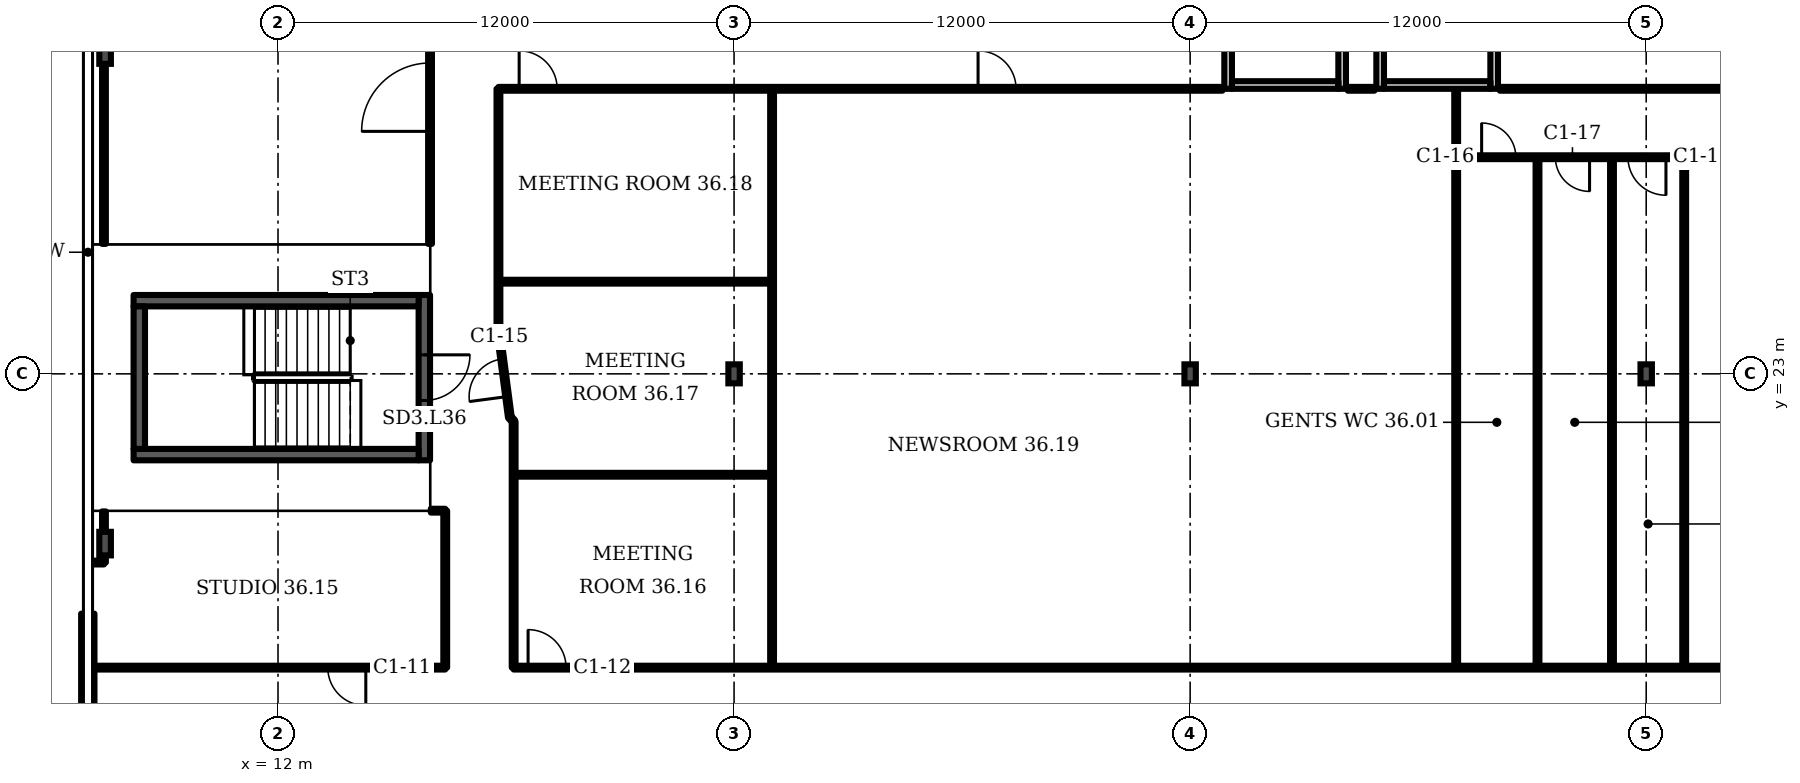
"""IFC4 building model, lengths in metres.
Left out: names, types, materials, properties, quantities, classifications, styles, units other than length and angle.
Written with IfcOpenShell. Run it as: python <this file> out.ifc"""

import sys

from ifc_helpers import new_model, si_unit, direction, frame, frame_2d, origin, origin_2d, place, context, subcontext, project, spatial, rectangle, i_section, extrude, element, fill, save


model = new_model("IFC4")
c1 = context("Model", 3, precision=1e-05, world=origin(), true_north=direction((0.0, 1.0)))
c2 = subcontext(c1, "Body", "Model", "MODEL_VIEW")
j1 = project(units=[si_unit("LENGTHUNIT", "METRE"), si_unit("PLANEANGLEUNIT", "RADIAN")], contexts=[c1])
p1 = place(None, origin())
s1 = spatial("IfcSite", under=j1, at=p1, CompositionType="ELEMENT")
p2 = place(p1, origin())
s2 = spatial("IfcBuilding", under=s1, at=p2, CompositionType="ELEMENT")
p3 = place(p2, frame((0.0, 0.0, 151.9)))
s3 = spatial("IfcBuildingStorey", under=s2, at=p3, CompositionType="ELEMENT", Elevation=151.9)
for number, where, z_axis, x_axis in (
    (1, (7.45, 31.467, 0.0), (0.0, 0.0, 1.0), (-1.0, 0.0, 0.0)),
    (2, (7.45, 18.533, 0.0), (0.0, 0.0, 1.0), (-1.0, 0.0, 0.0)),
):
    element("IfcColumn", number, at=place(p3, frame(where, z_axis=z_axis, x_axis=x_axis)), inside=s3, PredefinedType="COLUMN", context=c2, shape_type="SweptSolid", body=[
        extrude(i_section(OverallWidth=0.305, OverallDepth=0.62, WebThickness=0.021, FlangeThickness=0.04, FilletRadius=0.027, at=origin_2d()), origin(), (0.0, 0.0, 1.0), 3.6),
    ])
for number, where, z_axis, x_axis in (
    (3, (24.0, 23.0, 0.0), (0.0, 0.0, 1.0), (1.0, 0.0, 0.0)),
    (4, (36.0, 23.0, 0.0), (0.0, 0.0, 1.0), (1.0, 0.0, 0.0)),
    (5, (48.0, 23.0, 0.0), (0.0, 0.0, 1.0), (1.0, 0.0, 0.0)),
):
    element("IfcColumn", number, at=place(p3, frame(where, z_axis=z_axis, x_axis=x_axis)), inside=s3, PredefinedType="COLUMN", context=c2, shape_type="SweptSolid", body=[
        extrude(i_section(OverallWidth=0.3, OverallDepth=0.5, WebThickness=0.014, FlangeThickness=0.028, FilletRadius=0.027, at=origin_2d()), origin(), (0.0, 0.0, 1.0), 3.6),
    ])
p4 = place(p3, frame((6.995, 16.69, 0.0), z_axis=(0.0, 0.0, 1.0), x_axis=(0.0, -1.0, 0.0)))
e6 = element("IfcWall", 6, at=p4, inside=s3, PredefinedType="SOLIDWALL", context=c2, shape_type="SweptSolid", body=[
    extrude(rectangle(XDim=6.29, YDim=0.35, at=frame_2d((3.145, 0.0))), origin(), (0.0, 0.0, 1.0), 1.0),
])
p5 = place(p3, frame((37.0, 30.5, 0.0), z_axis=(0.0, 0.0, 1.0), x_axis=(0.0, 1.0, 0.0)))
e7 = element("IfcWall", 7, at=p5, inside=s3, PredefinedType="PARTITIONING", context=c2, shape_type="SweptSolid", body=[
    extrude(rectangle(XDim=3.5, YDim=0.2, at=frame_2d((1.75, 0.0))), origin(), (0.0, 0.0, 1.0), 3.2),
])
p6 = place(p5, frame((1.2, 0.0, 0.0)))
e8 = element("IfcOpeningElement", 8, at=p6, cuts=e7, PredefinedType="OPENING", context=c2, shape_type="SweptSolid", body=[
    extrude(rectangle(XDim=1.1, YDim=2.1, at=frame_2d((0.55, 1.05))), frame((0.0, 0.11, 0.0), z_axis=(0.0, -1.0, 0.0), x_axis=(1.0, 0.0, 0.0)), (0.0, 0.0, 1.0), 0.22),
])
p7 = place(p3, frame((40.0, 30.5, 0.0), z_axis=(0.0, 0.0, 1.0), x_axis=(0.0, 1.0, 0.0)))
e9 = element("IfcWall", 9, at=p7, inside=s3, PredefinedType="PARTITIONING", context=c2, shape_type="SweptSolid", body=[
    extrude(rectangle(XDim=3.5, YDim=0.2, at=frame_2d((1.75, 0.0))), origin(), (0.0, 0.0, 1.0), 3.2),
])
p8 = place(p3, frame((37.1, 30.6, 0.0), z_axis=(0.0, 0.0, 1.0), x_axis=(1.0, 0.0, 0.0)))
e10 = element("IfcWall", 10, at=p8, inside=s3, PredefinedType="PARTITIONING", context=c2, shape_type="SweptSolid", body=[
    extrude(rectangle(XDim=2.8, YDim=0.2, at=frame_2d((1.4, 0.0))), origin(), (0.0, 0.0, 1.0), 3.2),
])
p9 = place(p3, frame((41.0, 30.5, 0.0), z_axis=(0.0, 0.0, 1.0), x_axis=(0.0, 1.0, 0.0)))
e11 = element("IfcWall", 11, at=p9, inside=s3, PredefinedType="PARTITIONING", context=c2, shape_type="SweptSolid", body=[
    extrude(rectangle(XDim=3.5, YDim=0.2, at=frame_2d((1.75, 0.0))), origin(), (0.0, 0.0, 1.0), 3.2),
])
p10 = place(p3, frame((44.0, 30.5, 0.0), z_axis=(0.0, 0.0, 1.0), x_axis=(0.0, 1.0, 0.0)))
e12 = element("IfcWall", 12, at=p10, inside=s3, PredefinedType="PARTITIONING", context=c2, shape_type="SweptSolid", body=[
    extrude(rectangle(XDim=3.5, YDim=0.2, at=frame_2d((1.75, 0.0))), origin(), (0.0, 0.0, 1.0), 3.2),
])
p11 = place(p10, frame((1.2, 0.0, 0.0)))
e13 = element("IfcOpeningElement", 13, at=p11, cuts=e12, PredefinedType="OPENING", context=c2, shape_type="SweptSolid", body=[
    extrude(rectangle(XDim=1.1, YDim=2.1, at=frame_2d((0.55, 1.05))), frame((0.0, 0.11, 0.0), z_axis=(0.0, -1.0, 0.0), x_axis=(1.0, 0.0, 0.0)), (0.0, 0.0, 1.0), 0.22),
])
p12 = place(p3, frame((41.1, 30.6, 0.0), z_axis=(0.0, 0.0, 1.0), x_axis=(1.0, 0.0, 0.0)))
e14 = element("IfcWall", 14, at=p12, inside=s3, PredefinedType="PARTITIONING", context=c2, shape_type="SweptSolid", body=[
    extrude(rectangle(XDim=2.8, YDim=0.2, at=frame_2d((1.4, 0.0))), origin(), (0.0, 0.0, 1.0), 3.2),
])
p13 = place(p3, frame((15.85, 20.725, 0.0), z_axis=(0.0, 0.0, 1.0), x_axis=(0.0, 1.0, 0.0)))
e15 = element("IfcWall", 15, at=p13, inside=s3, PredefinedType="SHEAR", context=c2, shape_type="SweptSolid", body=[
    extrude(rectangle(XDim=4.35, YDim=0.3, at=frame_2d((2.175, 0.0))), origin(), (0.0, 0.0, 1.0), 3.2),
])
p14 = place(p13, frame((1.575, 0.0, 0.0)))
e16 = element("IfcOpeningElement", 16, at=p14, cuts=e15, PredefinedType="OPENING", context=c2, shape_type="SweptSolid", body=[
    extrude(rectangle(XDim=1.2, YDim=2.1, at=frame_2d((0.6, 1.05))), frame((0.0, 0.16, 0.0), z_axis=(0.0, -1.0, 0.0), x_axis=(1.0, 0.0, 0.0)), (0.0, 0.0, 1.0), 0.32),
])
p15 = place(p3, frame((7.02, 15.27, 0.0), z_axis=(0.0, 0.0, 1.0), x_axis=(1.0, 0.0, 0.0)))
e17 = element("IfcWall", 17, at=p15, inside=s3, PredefinedType="PARTITIONING", context=c2, shape_type="SweptSolid", body=[
    extrude(rectangle(XDim=9.38, YDim=0.1, at=frame_2d((4.69, 0.0))), origin(), (0.0, 0.0, 1.0), 3.2),
])
p16 = place(p15, frame((6.29, 0.0, 0.0)))
e18 = element("IfcOpeningElement", 18, at=p16, cuts=e17, PredefinedType="OPENING", context=c2, shape_type="SweptSolid", body=[
    extrude(rectangle(XDim=1.0, YDim=2.1, at=frame_2d((0.5, 1.05))), frame((0.0, 0.06, 0.0), z_axis=(0.0, -1.0, 0.0), x_axis=(1.0, 0.0, 0.0)), (0.0, 0.0, 1.0), 0.12),
])
p17 = place(p3, frame((7.02, 18.035, 0.0), z_axis=(0.0, 0.0, 1.0), x_axis=(1.0, 0.0, 0.0)))
e19 = element("IfcWall", 19, at=p17, inside=s3, PredefinedType="PARTITIONING", context=c2, shape_type="SweptSolid", body=[
    extrude(rectangle(XDim=0.4, YDim=0.1, at=frame_2d((0.2, 0.0))), origin(), (0.0, 0.0, 1.0), 3.2),
])
p18 = place(p3, frame((7.42, 18.035, 0.0), z_axis=(0.0, 0.0, 1.0), x_axis=(0.0, 1.0, 0.0)))
e20 = element("IfcWall", 20, at=p18, inside=s3, PredefinedType="PARTITIONING", context=c2, shape_type="SweptSolid", body=[
    extrude(rectangle(XDim=1.345, YDim=0.1, at=frame_2d((0.672, 0.0))), origin(), (0.0, 0.0, 1.0), 2.58),
])
p19 = place(p3, frame((7.42, 26.42, 0.0), z_axis=(0.0, 0.0, 1.0), x_axis=(0.0, 1.0, 0.0)))
e21 = element("IfcWall", 21, at=p19, inside=s3, PredefinedType="PARTITIONING", context=c2, shape_type="SweptSolid", body=[
    extrude(rectangle(XDim=15.56, YDim=0.1, at=frame_2d((7.78, 0.0))), origin(), (0.0, 0.0, 1.0), 2.58),
])
p20 = place(p3, frame((16.0, 26.42, 0.0), z_axis=(0.0, 0.0, 1.0), x_axis=(0.0, 1.0, 0.0)))
e22 = element("IfcWall", 22, at=p20, inside=s3, PredefinedType="PARTITIONING", context=c2, shape_type="SweptSolid", body=[
    extrude(rectangle(XDim=7.56, YDim=0.1, at=frame_2d((3.78, 0.0))), origin(), (0.0, 0.0, 1.0), 3.2),
])
p21 = place(p20, frame((2.96, 0.0, 0.0)))
e23 = element("IfcOpeningElement", 23, at=p21, cuts=e22, PredefinedType="OPENING", context=c2, shape_type="SweptSolid", body=[
    extrude(rectangle(XDim=1.8, YDim=2.1, at=frame_2d((0.9, 1.05))), frame((0.0, 0.06, 0.0), z_axis=(0.0, -1.0, 0.0), x_axis=(1.0, 0.0, 0.0)), (0.0, 0.0, 1.0), 0.12),
])
p22 = place(p3, frame((16.02, 19.4, 0.0), z_axis=(0.0, 0.0, 1.0), x_axis=(1.0, 0.0, 0.0)))
e24 = element("IfcWall", 24, at=p22, inside=s3, PredefinedType="PARTITIONING", context=c2, shape_type="SweptSolid", body=[
    extrude(rectangle(XDim=0.38, YDim=0.1, at=frame_2d((0.19, 0.0))), origin(), (0.0, 0.0, 1.0), 3.2),
])
p23 = place(p3, frame((16.4, 15.27, 0.0), z_axis=(0.0, 0.0, 1.0), x_axis=(0.0, 1.0, 0.0)))
e25 = element("IfcWall", 25, at=p23, inside=s3, PredefinedType="PARTITIONING", context=c2, shape_type="SweptSolid", body=[
    extrude(rectangle(XDim=4.13, YDim=0.1, at=frame_2d((2.065, 0.0))), origin(), (0.0, 0.0, 1.0), 3.2),
])
p24 = place(p3, frame((17.8, 24.135, 0.0), z_axis=(0.0, 0.0, 1.0), x_axis=(0.0, 1.0, 0.0)))
e26 = element("IfcWall", 26, at=p24, inside=s3, PredefinedType="PARTITIONING", context=c2, shape_type="SweptSolid", body=[
    extrude(rectangle(XDim=6.365, YDim=0.1, at=frame_2d((3.183, 0.0))), origin(), (0.0, 0.0, 1.0), 3.2),
])
p25 = place(p3, frame((17.8, 25.425, 0.0), z_axis=(0.0, 0.0, 1.0), x_axis=(1.0, 0.0, 0.0)))
e27 = element("IfcWall", 27, at=p25, inside=s3, PredefinedType="PARTITIONING", context=c2, shape_type="SweptSolid", body=[
    extrude(rectangle(XDim=7.2, YDim=0.1, at=frame_2d((3.6, 0.0))), origin(), (0.0, 0.0, 1.0), 3.2),
])
p26 = place(p3, frame((17.8, 30.5, 0.0), z_axis=(0.0, 0.0, 1.0), x_axis=(1.0, 0.0, 0.0)))
e28 = element("IfcWall", 28, at=p26, inside=s3, PredefinedType="PARTITIONING", context=c2, shape_type="SweptSolid", body=[
    extrude(rectangle(XDim=19.05, YDim=0.1, at=frame_2d((9.525, 0.0))), origin(), (0.0, 0.0, 1.0), 3.2),
])
p27 = place(p26, frame((0.545, 0.0, 0.0)))
e29 = element("IfcOpeningElement", 29, at=p27, cuts=e28, PredefinedType="OPENING", context=c2, shape_type="SweptSolid", body=[
    extrude(rectangle(XDim=1.0, YDim=2.1, at=frame_2d((0.5, 1.05))), frame((0.0, 0.06, 0.0), z_axis=(0.0, -1.0, 0.0), x_axis=(1.0, 0.0, 0.0)), (0.0, 0.0, 1.0), 0.12),
])
p28 = place(p26, frame((12.62, 0.0, 0.0)))
e30 = element("IfcOpeningElement", 30, at=p28, cuts=e28, PredefinedType="OPENING", context=c2, shape_type="SweptSolid", body=[
    extrude(rectangle(XDim=1.0, YDim=2.1, at=frame_2d((0.5, 1.05))), frame((0.0, 0.06, 0.0), z_axis=(0.0, -1.0, 0.0), x_axis=(1.0, 0.0, 0.0)), (0.0, 0.0, 1.0), 0.12),
])
p29 = place(p3, frame((18.1, 21.86, 0.0), z_axis=(0.0, 0.0, 1.0), x_axis=(-0.130763, 0.991415, 0.0)))
e31 = element("IfcWall", 31, at=p29, inside=s3, PredefinedType="PARTITIONING", context=c2, shape_type="SweptSolid", body=[
    extrude(rectangle(XDim=2.295, YDim=0.1, at=frame_2d((1.147, 0.0))), origin(), (0.0, 0.0, 1.0), 3.2),
])
p30 = place(p29, frame((0.546, 0.0, 0.0)))
e32 = element("IfcOpeningElement", 32, at=p30, cuts=e31, PredefinedType="OPENING", context=c2, shape_type="SweptSolid", body=[
    extrude(rectangle(XDim=1.0, YDim=2.1, at=frame_2d((0.5, 1.05))), frame((0.0, 0.06, 0.0), z_axis=(0.0, -1.0, 0.0), x_axis=(1.0, 0.0, 0.0)), (0.0, 0.0, 1.0), 0.12),
])
p31 = place(p3, frame((18.2, 21.75, 0.0), z_axis=(0.0, 0.0, 1.0), x_axis=(-0.671773, 0.740757, 0.0)))
e33 = element("IfcWall", 33, at=p31, inside=s3, PredefinedType="PARTITIONING", context=c2, shape_type="SweptSolid", body=[
    extrude(rectangle(XDim=0.149, YDim=0.1, at=frame_2d((0.074, 0.0))), origin(), (0.0, 0.0, 1.0), 3.2),
])
p32 = place(p3, frame((18.2, 15.27, 0.0), z_axis=(0.0, 0.0, 1.0), x_axis=(0.0, 1.0, 0.0)))
e34 = element("IfcWall", 34, at=p32, inside=s3, PredefinedType="PARTITIONING", context=c2, shape_type="SweptSolid", body=[
    extrude(rectangle(XDim=6.48, YDim=0.1, at=frame_2d((3.24, 0.0))), origin(), (0.0, 0.0, 1.0), 3.2),
])
p33 = place(p3, frame((18.2, 15.27, 0.0), z_axis=(0.0, 0.0, 1.0), x_axis=(1.0, 0.0, 0.0)))
e35 = element("IfcWall", 35, at=p33, inside=s3, PredefinedType="PARTITIONING", context=c2, shape_type="SweptSolid", body=[
    extrude(rectangle(XDim=62.291, YDim=0.1, at=frame_2d((31.146, 0.0))), origin(), (0.0, 0.0, 1.0), 2.58),
])
p34 = place(p33, frame((0.38, 0.0, 0.0)))
e36 = element("IfcOpeningElement", 36, at=p34, cuts=e35, PredefinedType="OPENING", context=c2, shape_type="SweptSolid", body=[
    extrude(rectangle(XDim=1.0, YDim=2.1, at=frame_2d((0.5, 1.05))), frame((0.0, 0.06, 0.0), z_axis=(0.0, -1.0, 0.0), x_axis=(1.0, 0.0, 0.0)), (0.0, 0.0, 1.0), 0.12),
])
p35 = place(p33, frame((58.102, 0.0, 0.0)))
e37 = element("IfcOpeningElement", 37, at=p35, cuts=e35, PredefinedType="OPENING", context=c2, shape_type="SweptSolid", body=[
    extrude(rectangle(XDim=1.0, YDim=2.1, at=frame_2d((0.5, 1.05))), frame((0.0, 0.06, 0.0), z_axis=(0.0, -1.0, 0.0), x_axis=(1.0, 0.0, 0.0)), (0.0, 0.0, 1.0), 0.12),
])
p36 = place(p3, frame((18.2, 20.345, 0.0), z_axis=(0.0, 0.0, 1.0), x_axis=(1.0, 0.0, 0.0)))
e38 = element("IfcWall", 38, at=p36, inside=s3, PredefinedType="PARTITIONING", context=c2, shape_type="SweptSolid", body=[
    extrude(rectangle(XDim=6.8, YDim=0.1, at=frame_2d((3.4, 0.0))), origin(), (0.0, 0.0, 1.0), 3.2),
])
p37 = place(p3, frame((25.0, 15.27, 0.0), z_axis=(0.0, 0.0, 1.0), x_axis=(0.0, 1.0, 0.0)))
e39 = element("IfcWall", 39, at=p37, inside=s3, PredefinedType="PARTITIONING", context=c2, shape_type="SweptSolid", body=[
    extrude(rectangle(XDim=15.23, YDim=0.1, at=frame_2d((7.615, 0.0))), origin(), (0.0, 0.0, 1.0), 3.2),
])
p38 = place(p3, frame((43.0, 15.27, 0.0), z_axis=(0.0, 0.0, 1.0), x_axis=(0.0, 1.0, 0.0)))
e40 = element("IfcWall", 40, at=p38, inside=s3, PredefinedType="PARTITIONING", context=c2, shape_type="SweptSolid", body=[
    extrude(rectangle(XDim=15.22, YDim=0.1, at=frame_2d((7.61, 0.0))), origin(), (0.0, 0.0, 1.0), 3.2),
])
p39 = place(p3, frame((43.0, 28.7, 0.0), z_axis=(0.0, 0.0, 1.0), x_axis=(1.0, 0.0, 0.0)))
e41 = element("IfcWall", 41, at=p39, inside=s3, PredefinedType="PARTITIONING", context=c2, shape_type="SweptSolid", body=[
    extrude(rectangle(XDim=6.0, YDim=0.1, at=frame_2d((3.0, 0.0))), origin(), (0.0, 0.0, 1.0), 3.2),
])
p40 = place(p39, frame((0.67, 0.0, 0.0)))
e42 = element("IfcOpeningElement", 42, at=p40, cuts=e41, PredefinedType="OPENING", context=c2, shape_type="SweptSolid", body=[
    extrude(rectangle(XDim=0.9, YDim=2.1, at=frame_2d((0.45, 1.05))), frame((0.0, 0.06, 0.0), z_axis=(0.0, -1.0, 0.0), x_axis=(1.0, 0.0, 0.0)), (0.0, 0.0, 1.0), 0.12),
])
p41 = place(p39, frame((2.61, 0.0, 0.0)))
e43 = element("IfcOpeningElement", 43, at=p41, cuts=e41, PredefinedType="OPENING", context=c2, shape_type="SweptSolid", body=[
    extrude(rectangle(XDim=0.9, YDim=2.1, at=frame_2d((0.45, 1.05))), frame((0.0, 0.06, 0.0), z_axis=(0.0, -1.0, 0.0), x_axis=(1.0, 0.0, 0.0)), (0.0, 0.0, 1.0), 0.12),
])
p42 = place(p39, frame((4.52, 0.0, 0.0)))
e44 = element("IfcOpeningElement", 44, at=p42, cuts=e41, PredefinedType="OPENING", context=c2, shape_type="SweptSolid", body=[
    extrude(rectangle(XDim=1.0, YDim=2.1, at=frame_2d((0.5, 1.05))), frame((0.0, 0.06, 0.0), z_axis=(0.0, -1.0, 0.0), x_axis=(1.0, 0.0, 0.0)), (0.0, 0.0, 1.0), 0.12),
])
for number, where, z_axis, x_axis in (
    (45, (45.14, 15.27, 0.0), (0.0, 0.0, 1.0), (0.0, 1.0, 0.0)),
    (46, (47.1, 15.27, 0.0), (0.0, 0.0, 1.0), (0.0, 1.0, 0.0)),
    (47, (49.0, 15.27, 0.0), (0.0, 0.0, 1.0), (0.0, 1.0, 0.0)),
):
    element("IfcWall", number, at=place(p3, frame(where, z_axis=z_axis, x_axis=x_axis)), inside=s3, PredefinedType="PARTITIONING", context=c2, shape_type="SweptSolid", body=[
        extrude(rectangle(XDim=13.43, YDim=0.1, at=frame_2d((6.715, 0.0))), origin(), (0.0, 0.0, 1.0), 3.2),
    ])
p43 = place(p3, frame((40.15, 30.5, 0.0), z_axis=(0.0, 0.0, 1.0), x_axis=(1.0, 0.0, 0.0)))
e48 = element("IfcWall", 48, at=p43, inside=s3, PredefinedType="PARTITIONING", context=c2, shape_type="SweptSolid", body=[
    extrude(rectangle(XDim=0.7, YDim=0.1, at=frame_2d((0.35, 0.0))), origin(), (0.0, 0.0, 1.0), 3.2),
])
p44 = place(p3, frame((44.15, 30.5, 0.0), z_axis=(0.0, 0.0, 1.0), x_axis=(1.0, 0.0, 0.0)))
e49 = element("IfcWall", 49, at=p44, inside=s3, PredefinedType="PARTITIONING", context=c2, shape_type="SweptSolid", body=[
    extrude(rectangle(XDim=12.425, YDim=0.1, at=frame_2d((6.212, 0.0))), origin(), (0.0, 0.0, 1.0), 3.2),
])
p45 = place(p44, frame((11.15, 0.0, 0.0)))
e50 = element("IfcOpeningElement", 50, at=p45, cuts=e49, PredefinedType="OPENING", context=c2, shape_type="SweptSolid", body=[
    extrude(rectangle(XDim=1.0, YDim=2.1, at=frame_2d((0.5, 1.05))), frame((0.0, 0.06, 0.0), z_axis=(0.0, -1.0, 0.0), x_axis=(1.0, 0.0, 0.0)), (0.0, 0.0, 1.0), 0.12),
])
for number, where, z_axis, x_axis in (
    (51, (8.2, 20.875, 0.0), (0.0, 0.0, 1.0), (1.0, 0.0, 0.0)),
    (52, (8.2, 24.925, 0.0), (0.0, 0.0, 1.0), (1.0, 0.0, 0.0)),
):
    element("IfcWall", number, at=place(p3, frame(where, z_axis=z_axis, x_axis=x_axis)), inside=s3, PredefinedType="SHEAR", context=c2, shape_type="SweptSolid", body=[
        extrude(rectangle(XDim=7.5, YDim=0.3, at=frame_2d((3.75, 0.0))), origin(), (0.0, 0.0, 1.0), 3.2),
    ])
p46 = place(p3, frame((8.35, 21.025, 0.0), z_axis=(0.0, 0.0, 1.0), x_axis=(0.0, 1.0, 0.0)))
e53 = element("IfcWall", 53, at=p46, inside=s3, PredefinedType="SHEAR", context=c2, shape_type="SweptSolid", body=[
    extrude(rectangle(XDim=3.75, YDim=0.3, at=frame_2d((1.875, 0.0))), origin(), (0.0, 0.0, 1.0), 3.2),
])
p47 = place(p14, origin())
e54 = element("IfcDoor", 54, at=p47, inside=s3, OperationType="SINGLE_SWING_RIGHT", PredefinedType="DOOR", context=c2, shape_type="SweptSolid", body=[
    extrude(rectangle(XDim=1.2, YDim=2.1, at=frame_2d((0.6, 1.05))), frame((0.0, 0.025, 0.0), z_axis=(0.0, -1.0, 0.0), x_axis=(1.0, 0.0, 0.0)), (0.0, 0.0, 1.0), 0.05),
])
fill(e16, e54)
p48 = place(p16, origin())
e55 = element("IfcDoor", 55, at=p48, inside=s3, OperationType="SINGLE_SWING_RIGHT", PredefinedType="DOOR", context=c2, shape_type="SweptSolid", body=[
    extrude(rectangle(XDim=1.0, YDim=2.1, at=frame_2d((0.5, 1.05))), frame((0.0, 0.025, 0.0), z_axis=(0.0, -1.0, 0.0), x_axis=(1.0, 0.0, 0.0)), (0.0, 0.0, 1.0), 0.05),
])
fill(e18, e55)
p49 = place(p34, origin())
e56 = element("IfcDoor", 56, at=p49, inside=s3, OperationType="SINGLE_SWING_LEFT", PredefinedType="DOOR", context=c2, shape_type="SweptSolid", body=[
    extrude(rectangle(XDim=1.0, YDim=2.1, at=frame_2d((0.5, 1.05))), frame((0.0, 0.025, 0.0), z_axis=(0.0, -1.0, 0.0), x_axis=(1.0, 0.0, 0.0)), (0.0, 0.0, 1.0), 0.05),
])
fill(e36, e56)
p50 = place(p30, origin())
e57 = element("IfcDoor", 57, at=p50, inside=s3, OperationType="SINGLE_SWING_LEFT", PredefinedType="DOOR", context=c2, shape_type="SweptSolid", body=[
    extrude(rectangle(XDim=1.0, YDim=2.1, at=frame_2d((0.5, 1.05))), frame((0.0, 0.025, 0.0), z_axis=(0.0, -1.0, 0.0), x_axis=(1.0, 0.0, 0.0)), (0.0, 0.0, 1.0), 0.05),
])
fill(e32, e57)
p51 = place(p40, origin())
e58 = element("IfcDoor", 58, at=p51, inside=s3, OperationType="SINGLE_SWING_LEFT", PredefinedType="DOOR", context=c2, shape_type="SweptSolid", body=[
    extrude(rectangle(XDim=0.9, YDim=2.1, at=frame_2d((0.45, 1.05))), frame((0.0, 0.025, 0.0), z_axis=(0.0, -1.0, 0.0), x_axis=(1.0, 0.0, 0.0)), (0.0, 0.0, 1.0), 0.05),
])
fill(e42, e58)
p52 = place(p41, origin())
e59 = element("IfcDoor", 59, at=p52, inside=s3, OperationType="SINGLE_SWING_RIGHT", PredefinedType="DOOR", context=c2, shape_type="SweptSolid", body=[
    extrude(rectangle(XDim=0.9, YDim=2.1, at=frame_2d((0.45, 1.05))), frame((0.0, 0.025, 0.0), z_axis=(0.0, -1.0, 0.0), x_axis=(1.0, 0.0, 0.0)), (0.0, 0.0, 1.0), 0.05),
])
fill(e43, e59)
p53 = place(p42, origin())
e60 = element("IfcDoor", 60, at=p53, inside=s3, OperationType="SINGLE_SWING_RIGHT", PredefinedType="DOOR", context=c2, shape_type="SweptSolid", body=[
    extrude(rectangle(XDim=1.0, YDim=2.1, at=frame_2d((0.5, 1.05))), frame((0.0, 0.025, 0.0), z_axis=(0.0, -1.0, 0.0), x_axis=(1.0, 0.0, 0.0)), (0.0, 0.0, 1.0), 0.05),
])
fill(e44, e60)
p54 = place(p21, origin())
e61 = element("IfcDoor", 61, at=p54, inside=s3, OperationType="DOUBLE_DOOR_SINGLE_SWING", PredefinedType="DOOR", context=c2, shape_type="SweptSolid", body=[
    extrude(rectangle(XDim=1.8, YDim=2.1, at=frame_2d((0.9, 1.05))), frame((0.0, 0.025, 0.0), z_axis=(0.0, -1.0, 0.0), x_axis=(1.0, 0.0, 0.0)), (0.0, 0.0, 1.0), 0.05),
])
fill(e23, e61)
p55 = place(p27, origin())
e62 = element("IfcDoor", 62, at=p55, inside=s3, OperationType="SINGLE_SWING_LEFT", PredefinedType="DOOR", context=c2, shape_type="SweptSolid", body=[
    extrude(rectangle(XDim=1.0, YDim=2.1, at=frame_2d((0.5, 1.05))), frame((0.0, 0.025, 0.0), z_axis=(0.0, -1.0, 0.0), x_axis=(1.0, 0.0, 0.0)), (0.0, 0.0, 1.0), 0.05),
])
fill(e29, e62)
p56 = place(p28, origin())
e63 = element("IfcDoor", 63, at=p56, inside=s3, OperationType="SINGLE_SWING_LEFT", PredefinedType="DOOR", context=c2, shape_type="SweptSolid", body=[
    extrude(rectangle(XDim=1.0, YDim=2.1, at=frame_2d((0.5, 1.05))), frame((0.0, 0.025, 0.0), z_axis=(0.0, -1.0, 0.0), x_axis=(1.0, 0.0, 0.0)), (0.0, 0.0, 1.0), 0.05),
])
fill(e30, e63)
save(model, sys.argv[1])
